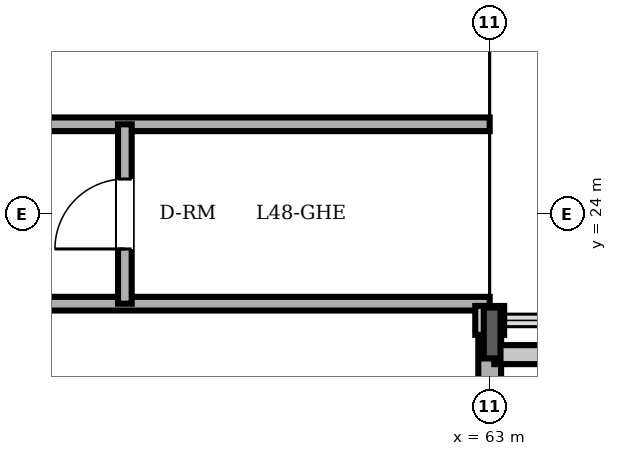
"""IFC4 building model, lengths in metres.
Left out: names, types, materials, properties, quantities, classifications, styles, units other than length and angle.
Written with IfcOpenShell. Run it as: python <this file> out.ifc"""

import sys

from ifc_helpers import new_model, si_unit, direction, frame, frame_2d, origin, place, context, subcontext, project, spatial, rectangle, extrude, element, fill, save


model = new_model("IFC4")
c1 = context("Model", 3, precision=1e-05, world=origin(), true_north=direction((0.0, 1.0)))
c2 = subcontext(c1, "Body", "Model", "MODEL_VIEW")
j1 = project(units=[si_unit("LENGTHUNIT", "METRE"), si_unit("PLANEANGLEUNIT", "RADIAN")], contexts=[c1])
p1 = place(None, origin())
s1 = spatial("IfcSite", under=j1, at=p1, CompositionType="ELEMENT")
p2 = place(p1, origin())
s2 = spatial("IfcBuilding", under=s1, at=p2, CompositionType="ELEMENT")
p3 = place(p2, frame((0.0, 0.0, 183.4)))
s3 = spatial("IfcBuildingStorey", under=s2, at=p3, CompositionType="ELEMENT", Elevation=183.4)
p4 = place(p3, frame((63.0, 16.8, 0.0), z_axis=(0.0, 0.0, 1.0), x_axis=(0.0, 1.0, 0.0)))
e1 = element("IfcWall", 1, at=p4, inside=s3, PredefinedType="SOLIDWALL", context=c2, shape_type="SweptSolid", body=[
    extrude(rectangle(XDim=5.8, YDim=0.3, at=frame_2d((2.9, 0.0))), origin(), (0.0, 0.0, 1.0), 3.4),
])
p5 = place(p4, frame((2.375, 0.0, 0.85)))
e2 = element("IfcOpeningElement", 2, at=p5, cuts=e1, PredefinedType="OPENING", context=c2, shape_type="SweptSolid", body=[
    extrude(rectangle(XDim=1.05, YDim=1.55, at=frame_2d((0.525, 0.775))), frame((0.0, 0.16, 0.0), z_axis=(0.0, -1.0, 0.0), x_axis=(1.0, 0.0, 0.0)), (0.0, 0.0, 1.0), 0.32),
])
p6 = place(p3, frame((41.75, 22.82, 0.0), z_axis=(0.0, 0.0, 1.0), x_axis=(1.0, 0.0, 0.0)))
e3 = element("IfcWall", 3, at=p6, inside=s3, PredefinedType="PARTITIONING", context=c2, shape_type="SweptSolid", body=[
    extrude(rectangle(XDim=21.25, YDim=0.18, at=frame_2d((10.625, 0.0))), origin(), (0.0, 0.0, 1.0), 3.4),
])
p7 = place(p6, frame((3.688, 0.0, 0.0)))
e4 = element("IfcOpeningElement", 4, at=p7, cuts=e3, PredefinedType="OPENING", context=c2, shape_type="SweptSolid", body=[
    extrude(rectangle(XDim=0.92, YDim=2.1, at=frame_2d((0.46, 1.05))), frame((0.0, 0.1, 0.0), z_axis=(0.0, -1.0, 0.0), x_axis=(1.0, 0.0, 0.0)), (0.0, 0.0, 1.0), 0.2),
])
p8 = place(p6, frame((7.765, 0.0, 0.0)))
e5 = element("IfcOpeningElement", 5, at=p8, cuts=e3, PredefinedType="OPENING", context=c2, shape_type="SweptSolid", body=[
    extrude(rectangle(XDim=0.92, YDim=2.1, at=frame_2d((0.46, 1.05))), frame((0.0, 0.1, 0.0), z_axis=(0.0, -1.0, 0.0), x_axis=(1.0, 0.0, 0.0)), (0.0, 0.0, 1.0), 0.2),
])
p9 = place(p6, frame((11.28, 0.0, 0.0)))
e6 = element("IfcOpeningElement", 6, at=p9, cuts=e3, PredefinedType="OPENING", context=c2, shape_type="SweptSolid", body=[
    extrude(rectangle(XDim=0.92, YDim=2.1, at=frame_2d((0.46, 1.05))), frame((0.0, 0.1, 0.0), z_axis=(0.0, -1.0, 0.0), x_axis=(1.0, 0.0, 0.0)), (0.0, 0.0, 1.0), 0.2),
])
p10 = place(p6, frame((14.233, 0.0, 0.0)))
e7 = element("IfcOpeningElement", 7, at=p10, cuts=e3, PredefinedType="OPENING", context=c2, shape_type="SweptSolid", body=[
    extrude(rectangle(XDim=0.92, YDim=2.1, at=frame_2d((0.46, 1.05))), frame((0.0, 0.1, 0.0), z_axis=(0.0, -1.0, 0.0), x_axis=(1.0, 0.0, 0.0)), (0.0, 0.0, 1.0), 0.2),
])
p11 = place(p3, frame((41.75, 25.18, 0.0), z_axis=(0.0, 0.0, 1.0), x_axis=(1.0, 0.0, 0.0)))
e8 = element("IfcWall", 8, at=p11, inside=s3, PredefinedType="PARTITIONING", context=c2, shape_type="SweptSolid", body=[
    extrude(rectangle(XDim=21.25, YDim=0.18, at=frame_2d((10.625, 0.0))), origin(), (0.0, 0.0, 1.0), 3.4),
])
p12 = place(p11, frame((5.861, 0.0, 0.0)))
e9 = element("IfcOpeningElement", 9, at=p12, cuts=e8, PredefinedType="OPENING", context=c2, shape_type="SweptSolid", body=[
    extrude(rectangle(XDim=0.92, YDim=2.1, at=frame_2d((0.46, 1.05))), frame((0.0, 0.1, 0.0), z_axis=(0.0, -1.0, 0.0), x_axis=(1.0, 0.0, 0.0)), (0.0, 0.0, 1.0), 0.2),
])
p13 = place(p11, frame((9.06, 0.0, 0.0)))
e10 = element("IfcOpeningElement", 10, at=p13, cuts=e8, PredefinedType="OPENING", context=c2, shape_type="SweptSolid", body=[
    extrude(rectangle(XDim=0.92, YDim=2.1, at=frame_2d((0.46, 1.05))), frame((0.0, 0.1, 0.0), z_axis=(0.0, -1.0, 0.0), x_axis=(1.0, 0.0, 0.0)), (0.0, 0.0, 1.0), 0.2),
])
p14 = place(p11, frame((13.477, 0.0, 0.0)))
e11 = element("IfcOpeningElement", 11, at=p14, cuts=e8, PredefinedType="OPENING", context=c2, shape_type="SweptSolid", body=[
    extrude(rectangle(XDim=0.92, YDim=2.1, at=frame_2d((0.46, 1.05))), frame((0.0, 0.1, 0.0), z_axis=(0.0, -1.0, 0.0), x_axis=(1.0, 0.0, 0.0)), (0.0, 0.0, 1.0), 0.2),
])
p15 = place(p3, frame((58.2, 22.82, 0.0), z_axis=(0.0, 0.0, 1.0), x_axis=(0.0, 1.0, 0.0)))
e12 = element("IfcWall", 12, at=p15, inside=s3, PredefinedType="PARTITIONING", context=c2, shape_type="SweptSolid", body=[
    extrude(rectangle(XDim=2.36, YDim=0.18, at=frame_2d((1.18, 0.0))), origin(), (0.0, 0.0, 1.0), 3.4),
])
p16 = place(p15, frame((0.72, 0.0, 0.0)))
e13 = element("IfcOpeningElement", 13, at=p16, cuts=e12, PredefinedType="OPENING", context=c2, shape_type="SweptSolid", body=[
    extrude(rectangle(XDim=0.92, YDim=2.1, at=frame_2d((0.46, 1.05))), frame((0.0, 0.1, 0.0), z_axis=(0.0, -1.0, 0.0), x_axis=(1.0, 0.0, 0.0)), (0.0, 0.0, 1.0), 0.2),
])
p17 = place(p16, origin())
e14 = element("IfcDoor", 14, at=p17, inside=s3, OperationType="SINGLE_SWING_LEFT", PredefinedType="DOOR", context=c2, shape_type="SweptSolid", body=[
    extrude(rectangle(XDim=0.92, YDim=2.1, at=frame_2d((0.46, 1.05))), frame((0.0, 0.025, 0.0), z_axis=(0.0, -1.0, 0.0), x_axis=(1.0, 0.0, 0.0)), (0.0, 0.0, 1.0), 0.05),
])
fill(e13, e14)
save(model, sys.argv[1])
